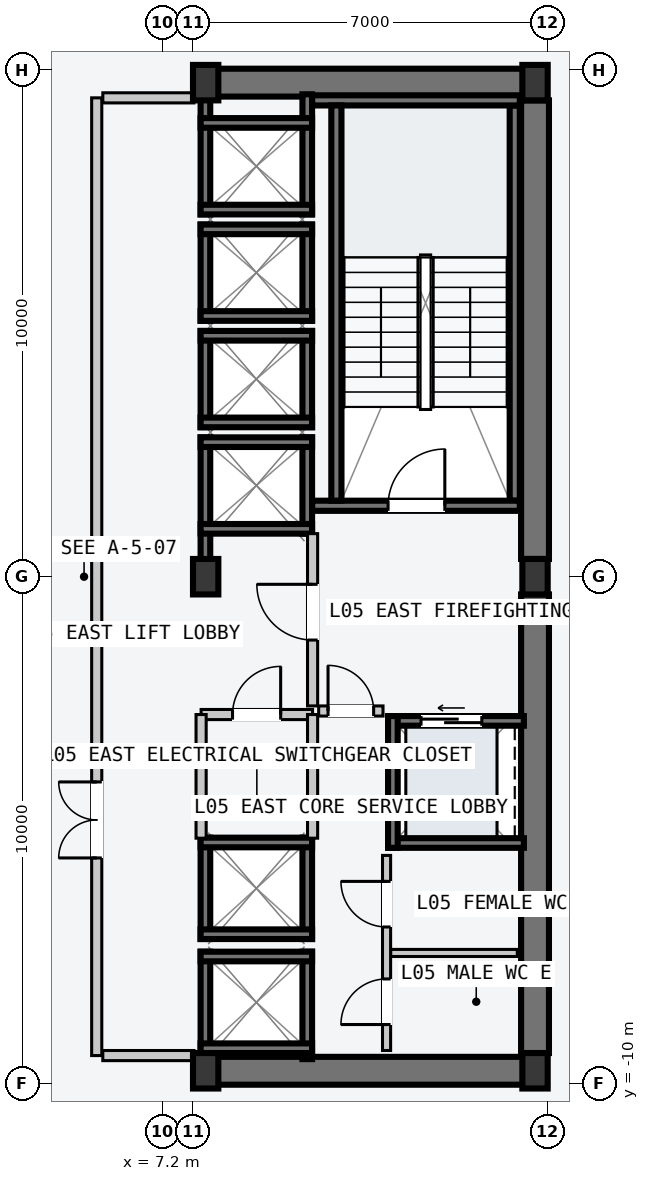
"""IFC4 building model, lengths in metres.
Left out: names, types, materials, properties, quantities, classifications, styles, units other than length and angle.
Written with IfcOpenShell. Run it as: python <this file> out.ifc"""

import sys

from ifc_helpers import new_model, si_unit, direction, frame, frame_2d, origin, origin_2d, place, context, subcontext, project, spatial, rectangle, i_section, extrude, element, fill, save


model = new_model("IFC4")
c1 = context("Model", 3, precision=1e-05, world=origin(), true_north=direction((0.0, 1.0)))
c2 = subcontext(c1, "Body", "Model", "MODEL_VIEW")
j1 = project(units=[si_unit("LENGTHUNIT", "METRE"), si_unit("PLANEANGLEUNIT", "RADIAN")], contexts=[c1])
p1 = place(None, origin())
s1 = spatial("IfcSite", under=j1, at=p1, CompositionType="ELEMENT")
p2 = place(p1, origin())
s2 = spatial("IfcBuilding", under=s1, at=p2, CompositionType="ELEMENT")
p3 = place(p2, frame((0.0, 0.0, 24.0)))
s3 = spatial("IfcBuildingStorey", under=s2, at=p3, CompositionType="ELEMENT", Elevation=24.0)
for number, where, z_axis, x_axis in (
    (1, (8.07, -9.75, -0.2), (0.0, 0.0, 1.0), (1.0, 0.0, 0.0)),
    (2, (8.07, 9.75, -0.2), (0.0, 0.0, 1.0), (1.0, 0.0, 0.0)),
):
    element("IfcWall", number, at=place(p3, frame(where, z_axis=z_axis, x_axis=x_axis)), inside=s3, PredefinedType="SHEAR", context=c2, shape_type="SweptSolid", body=[
        extrude(rectangle(XDim=6.46, YDim=0.55, at=frame_2d((3.23, 0.0))), origin(), (0.0, 0.0, 1.0), 3.6),
    ])
for number, where, z_axis, x_axis in (
    (3, (14.55, -9.4, -0.2), (0.0, 0.0, 1.0), (0.0, 1.0, 0.0)),
    (4, (14.55, 0.35, -0.2), (0.0, 0.0, 1.0), (0.0, 1.0, 0.0)),
):
    element("IfcWall", number, at=place(p3, frame(where, z_axis=z_axis, x_axis=x_axis)), inside=s3, PredefinedType="SHEAR", context=c2, shape_type="SweptSolid", body=[
        extrude(rectangle(XDim=9.05, YDim=0.55, at=frame_2d((4.525, 0.0))), origin(), (0.0, 0.0, 1.0), 3.6),
    ])
p4 = place(p3, frame((14.15, 1.5, -0.2), z_axis=(0.0, 0.0, 1.0), x_axis=(0.0, 1.0, 0.0)))
e5 = element("IfcWall", 5, at=p4, inside=s3, PredefinedType="SOLIDWALL", context=c2, shape_type="SweptSolid", body=[
    extrude(rectangle(XDim=7.8, YDim=0.2, at=frame_2d((3.9, 0.0))), origin(), (0.0, 0.0, 1.0), 3.6),
])
p5 = place(p3, frame((10.15, 1.4, -0.2), z_axis=(0.0, 0.0, 1.0), x_axis=(1.0, 0.0, 0.0)))
e6 = element("IfcWall", 6, at=p5, inside=s3, PredefinedType="SOLIDWALL", context=c2, shape_type="SweptSolid", body=[
    extrude(rectangle(XDim=4.1, YDim=0.2, at=frame_2d((2.05, 0.0))), origin(), (0.0, 0.0, 1.0), 3.6),
])
p6 = place(p5, frame((1.5, 0.0, 0.2)))
e7 = element("IfcOpeningElement", 7, at=p6, cuts=e6, PredefinedType="OPENING", context=c2, shape_type="SweptSolid", body=[
    extrude(rectangle(XDim=1.12, YDim=2.18, at=frame_2d((0.56, 1.09))), frame((0.0, 0.11, 0.0), z_axis=(0.0, -1.0, 0.0), x_axis=(1.0, 0.0, 0.0)), (0.0, 0.0, 1.0), 0.22),
])
p7 = place(p3, frame((10.15, 9.4, -0.2), z_axis=(0.0, 0.0, 1.0), x_axis=(1.0, 0.0, 0.0)))
e8 = element("IfcWall", 8, at=p7, inside=s3, PredefinedType="SOLIDWALL", context=c2, shape_type="SweptSolid", body=[
    extrude(rectangle(XDim=4.1, YDim=0.2, at=frame_2d((2.05, 0.0))), origin(), (0.0, 0.0, 1.0), 3.6),
])
p8 = place(p3, frame((10.63, 1.5, -0.2), z_axis=(0.0, 0.0, 1.0), x_axis=(0.0, 1.0, 0.0)))
e9 = element("IfcWall", 9, at=p8, inside=s3, PredefinedType="SOLIDWALL", context=c2, shape_type="SweptSolid", body=[
    extrude(rectangle(XDim=7.8, YDim=0.2, at=frame_2d((3.9, 0.0))), origin(), (0.0, 0.0, 1.0), 3.6),
])
for number, where, z_axis, x_axis in (
    (10, (8.05, -9.75, 0.0), (0.0, 0.0, 1.0), (1.0, 0.0, 0.0)),
    (11, (8.05, 0.0, 0.0), (0.0, 0.0, 1.0), (1.0, 0.0, 0.0)),
    (12, (8.05, 9.75, 0.0), (0.0, 0.0, 1.0), (1.0, 0.0, 0.0)),
    (13, (14.55, -9.75, 0.0), (0.0, 0.0, 1.0), (1.0, 0.0, 0.0)),
    (14, (14.55, 0.0, 0.0), (0.0, 0.0, 1.0), (1.0, 0.0, 0.0)),
    (15, (14.55, 9.75, 0.0), (0.0, 0.0, 1.0), (1.0, 0.0, 0.0)),
):
    element("IfcColumn", number, at=place(p3, frame(where, z_axis=z_axis, x_axis=x_axis)), inside=s3, PredefinedType="COLUMN", context=c2, shape_type="SweptSolid", body=[
        extrude(i_section(OverallWidth=0.5, OverallDepth=0.7, WebThickness=0.028, FlangeThickness=0.045, at=origin_2d()), origin(), (0.0, 0.0, 1.0), 3.6),
    ])
p9 = place(p3, frame((8.045, 0.21, -0.2), z_axis=(0.0, 0.0, 1.0), x_axis=(0.0, 1.0, 0.0)))
e16 = element("IfcWall", 16, at=p9, inside=s3, PredefinedType="SOLIDWALL", context=c2, shape_type="SweptSolid", body=[
    extrude(rectangle(XDim=2.54, YDim=0.19, at=frame_2d((1.27, 0.0))), origin(), (0.0, 0.0, 1.0), 3.6),
])
p10 = place(p3, frame((10.055, 0.85, -0.2), z_axis=(0.0, 0.0, 1.0), x_axis=(0.0, 1.0, 0.0)))
e17 = element("IfcWall", 17, at=p10, inside=s3, PredefinedType="SOLIDWALL", context=c2, shape_type="SweptSolid", body=[
    extrude(rectangle(XDim=1.9, YDim=0.19, at=frame_2d((0.95, 0.0))), origin(), (0.0, 0.0, 1.0), 3.6),
])
for number, where, z_axis, x_axis in (
    (18, (7.95, 2.655, -0.2), (0.0, 0.0, 1.0), (1.0, 0.0, 0.0)),
    (19, (7.95, 0.945, -0.2), (0.0, 0.0, 1.0), (1.0, 0.0, 0.0)),
):
    element("IfcWall", number, at=place(p3, frame(where, z_axis=z_axis, x_axis=x_axis)), inside=s3, PredefinedType="SOLIDWALL", context=c2, shape_type="SweptSolid", body=[
        extrude(rectangle(XDim=2.2, YDim=0.19, at=frame_2d((1.1, 0.0))), origin(), (0.0, 0.0, 1.0), 3.6),
    ])
for number, where, z_axis, x_axis in (
    (20, (8.045, 2.95, -0.2), (0.0, 0.0, 1.0), (0.0, 1.0, 0.0)),
    (21, (10.055, 2.95, -0.2), (0.0, 0.0, 1.0), (0.0, 1.0, 0.0)),
):
    element("IfcWall", number, at=place(p3, frame(where, z_axis=z_axis, x_axis=x_axis)), inside=s3, PredefinedType="SOLIDWALL", context=c2, shape_type="SweptSolid", body=[
        extrude(rectangle(XDim=1.9, YDim=0.19, at=frame_2d((0.95, 0.0))), origin(), (0.0, 0.0, 1.0), 3.6),
    ])
for number, where, z_axis, x_axis in (
    (22, (7.95, 4.755, -0.2), (0.0, 0.0, 1.0), (1.0, 0.0, 0.0)),
    (23, (7.95, 3.045, -0.2), (0.0, 0.0, 1.0), (1.0, 0.0, 0.0)),
):
    element("IfcWall", number, at=place(p3, frame(where, z_axis=z_axis, x_axis=x_axis)), inside=s3, PredefinedType="SOLIDWALL", context=c2, shape_type="SweptSolid", body=[
        extrude(rectangle(XDim=2.2, YDim=0.19, at=frame_2d((1.1, 0.0))), origin(), (0.0, 0.0, 1.0), 3.6),
    ])
for number, where, z_axis, x_axis in (
    (24, (8.045, 5.05, -0.2), (0.0, 0.0, 1.0), (0.0, 1.0, 0.0)),
    (25, (10.055, 5.05, -0.2), (0.0, 0.0, 1.0), (0.0, 1.0, 0.0)),
):
    element("IfcWall", number, at=place(p3, frame(where, z_axis=z_axis, x_axis=x_axis)), inside=s3, PredefinedType="SOLIDWALL", context=c2, shape_type="SweptSolid", body=[
        extrude(rectangle(XDim=1.9, YDim=0.19, at=frame_2d((0.95, 0.0))), origin(), (0.0, 0.0, 1.0), 3.6),
    ])
for number, where, z_axis, x_axis in (
    (26, (7.95, 6.855, -0.2), (0.0, 0.0, 1.0), (1.0, 0.0, 0.0)),
    (27, (7.95, 5.145, -0.2), (0.0, 0.0, 1.0), (1.0, 0.0, 0.0)),
):
    element("IfcWall", number, at=place(p3, frame(where, z_axis=z_axis, x_axis=x_axis)), inside=s3, PredefinedType="SOLIDWALL", context=c2, shape_type="SweptSolid", body=[
        extrude(rectangle(XDim=2.2, YDim=0.19, at=frame_2d((1.1, 0.0))), origin(), (0.0, 0.0, 1.0), 3.6),
    ])
for number, where, z_axis, x_axis in (
    (28, (8.045, 7.15, -0.2), (0.0, 0.0, 1.0), (0.0, 1.0, 0.0)),
    (29, (10.055, 7.15, -0.2), (0.0, 0.0, 1.0), (0.0, 1.0, 0.0)),
):
    element("IfcWall", number, at=place(p3, frame(where, z_axis=z_axis, x_axis=x_axis)), inside=s3, PredefinedType="SOLIDWALL", context=c2, shape_type="SweptSolid", body=[
        extrude(rectangle(XDim=2.37, YDim=0.19, at=frame_2d((1.185, 0.0))), origin(), (0.0, 0.0, 1.0), 3.6),
    ])
for number, where, z_axis, x_axis in (
    (30, (7.95, 8.955, -0.2), (0.0, 0.0, 1.0), (1.0, 0.0, 0.0)),
    (31, (7.95, 7.245, -0.2), (0.0, 0.0, 1.0), (1.0, 0.0, 0.0)),
):
    element("IfcWall", number, at=place(p3, frame(where, z_axis=z_axis, x_axis=x_axis)), inside=s3, PredefinedType="SOLIDWALL", context=c2, shape_type="SweptSolid", body=[
        extrude(rectangle(XDim=2.2, YDim=0.19, at=frame_2d((1.1, 0.0))), origin(), (0.0, 0.0, 1.0), 3.6),
    ])
for number, where, z_axis, x_axis in (
    (32, (8.045, -9.52, -0.2), (0.0, 0.0, 1.0), (0.0, 1.0, 0.0)),
    (33, (10.055, -9.52, -0.2), (0.0, 0.0, 1.0), (0.0, 1.0, 0.0)),
):
    element("IfcWall", number, at=place(p3, frame(where, z_axis=z_axis, x_axis=x_axis)), inside=s3, PredefinedType="SOLIDWALL", context=c2, shape_type="SweptSolid", body=[
        extrude(rectangle(XDim=2.12, YDim=0.19, at=frame_2d((1.06, 0.0))), origin(), (0.0, 0.0, 1.0), 3.6),
    ])
for number, where, z_axis, x_axis in (
    (34, (7.95, -7.495, -0.2), (0.0, 0.0, 1.0), (1.0, 0.0, 0.0)),
    (35, (7.95, -9.305, -0.2), (0.0, 0.0, 1.0), (1.0, 0.0, 0.0)),
):
    element("IfcWall", number, at=place(p3, frame(where, z_axis=z_axis, x_axis=x_axis)), inside=s3, PredefinedType="SOLIDWALL", context=c2, shape_type="SweptSolid", body=[
        extrude(rectangle(XDim=2.2, YDim=0.19, at=frame_2d((1.1, 0.0))), origin(), (0.0, 0.0, 1.0), 3.6),
    ])
for number, where, z_axis, x_axis in (
    (36, (8.045, -7.15, -0.2), (0.0, 0.0, 1.0), (0.0, 1.0, 0.0)),
    (37, (10.055, -7.15, -0.2), (0.0, 0.0, 1.0), (0.0, 1.0, 0.0)),
):
    element("IfcWall", number, at=place(p3, frame(where, z_axis=z_axis, x_axis=x_axis)), inside=s3, PredefinedType="SOLIDWALL", context=c2, shape_type="SweptSolid", body=[
        extrude(rectangle(XDim=2.0, YDim=0.19, at=frame_2d((1.0, 0.0))), origin(), (0.0, 0.0, 1.0), 3.6),
    ])
for number, where, z_axis, x_axis in (
    (38, (7.95, -5.245, -0.2), (0.0, 0.0, 1.0), (1.0, 0.0, 0.0)),
    (39, (7.95, -7.055, -0.2), (0.0, 0.0, 1.0), (1.0, 0.0, 0.0)),
):
    element("IfcWall", number, at=place(p3, frame(where, z_axis=z_axis, x_axis=x_axis)), inside=s3, PredefinedType="SOLIDWALL", context=c2, shape_type="SweptSolid", body=[
        extrude(rectangle(XDim=2.2, YDim=0.19, at=frame_2d((1.1, 0.0))), origin(), (0.0, 0.0, 1.0), 3.6),
    ])
p11 = place(p3, frame((11.65, -2.845, -0.2), z_axis=(0.0, 0.0, 1.0), x_axis=(1.0, 0.0, 0.0)))
e40 = element("IfcWall", 40, at=p11, inside=s3, PredefinedType="SOLIDWALL", context=c2, shape_type="SweptSolid", body=[
    extrude(rectangle(XDim=2.68, YDim=0.19, at=frame_2d((1.34, 0.0))), origin(), (0.0, 0.0, 1.0), 3.6),
])
p12 = place(p11, frame((0.65, 0.0, 0.2)))
e41 = element("IfcOpeningElement", 41, at=p12, cuts=e40, PredefinedType="OPENING", context=c2, shape_type="SweptSolid", body=[
    extrude(rectangle(XDim=1.2, YDim=2.2, at=frame_2d((0.6, 1.1))), frame((0.0, 0.105, 0.0), z_axis=(0.0, -1.0, 0.0), x_axis=(1.0, 0.0, 0.0)), (0.0, 0.0, 1.0), 0.21),
])
p13 = place(p3, frame((11.65, -5.255, -0.2), z_axis=(0.0, 0.0, 1.0), x_axis=(1.0, 0.0, 0.0)))
e42 = element("IfcWall", 42, at=p13, inside=s3, PredefinedType="SOLIDWALL", context=c2, shape_type="SweptSolid", body=[
    extrude(rectangle(XDim=2.68, YDim=0.19, at=frame_2d((1.34, 0.0))), origin(), (0.0, 0.0, 1.0), 3.6),
])
p14 = place(p3, frame((11.745, -5.35, -0.2), z_axis=(0.0, 0.0, 1.0), x_axis=(0.0, 1.0, 0.0)))
e43 = element("IfcWall", 43, at=p14, inside=s3, PredefinedType="SOLIDWALL", context=c2, shape_type="SweptSolid", body=[
    extrude(rectangle(XDim=2.6, YDim=0.19, at=frame_2d((1.3, 0.0))), origin(), (0.0, 0.0, 1.0), 3.6),
])
p15 = place(p3, frame((5.9, -9.45, 0.0), z_axis=(0.0, 0.0, 1.0), x_axis=(0.0, 1.0, 0.0)))
e44 = element("IfcWall", 44, at=p15, inside=s3, PredefinedType="PARTITIONING", context=c2, shape_type="SweptSolid", body=[
    extrude(rectangle(XDim=18.9, YDim=0.2, at=frame_2d((9.45, 0.0))), origin(), (0.0, 0.0, 1.0), 3.4),
])
p16 = place(p15, frame((3.9, 0.0, 0.0)))
e45 = element("IfcOpeningElement", 45, at=p16, cuts=e44, PredefinedType="OPENING", context=c2, shape_type="SweptSolid", body=[
    extrude(rectangle(XDim=1.5, YDim=2.2, at=frame_2d((0.75, 1.1))), frame((0.0, 0.11, 0.0), z_axis=(0.0, -1.0, 0.0), x_axis=(1.0, 0.0, 0.0)), (0.0, 0.0, 1.0), 0.22),
])
for number, where, z_axis, x_axis in (
    (46, (6.02, -9.45, 0.0), (0.0, 0.0, 1.0), (1.0, 0.0, 0.0)),
    (47, (6.02, 9.45, 0.0), (0.0, 0.0, 1.0), (1.0, 0.0, 0.0)),
):
    element("IfcWall", number, at=place(p3, frame(where, z_axis=z_axis, x_axis=x_axis)), inside=s3, PredefinedType="PARTITIONING", context=c2, shape_type="SweptSolid", body=[
        extrude(rectangle(XDim=1.8, YDim=0.2, at=frame_2d((0.9, 0.0))), origin(), (0.0, 0.0, 1.0), 3.4),
    ])
p17 = place(p3, frame((10.16, -2.55, 0.0), z_axis=(0.0, 0.0, 1.0), x_axis=(0.0, 1.0, 0.0)))
e48 = element("IfcWall", 48, at=p17, inside=s3, PredefinedType="PARTITIONING", context=c2, shape_type="SweptSolid", body=[
    extrude(rectangle(XDim=3.4, YDim=0.2, at=frame_2d((1.7, 0.0))), origin(), (0.0, 0.0, 1.0), 3.4),
])
p18 = place(p17, frame((1.3, 0.0, 0.0)))
e49 = element("IfcOpeningElement", 49, at=p18, cuts=e48, PredefinedType="OPENING", context=c2, shape_type="SweptSolid", body=[
    extrude(rectangle(XDim=1.1, YDim=2.15, at=frame_2d((0.55, 1.075))), frame((0.0, 0.11, 0.0), z_axis=(0.0, -1.0, 0.0), x_axis=(1.0, 0.0, 0.0)), (0.0, 0.0, 1.0), 0.22),
])
p19 = place(p3, frame((10.28, -2.65, 0.0), z_axis=(0.0, 0.0, 1.0), x_axis=(1.0, 0.0, 0.0)))
e50 = element("IfcWall", 50, at=p19, inside=s3, PredefinedType="PARTITIONING", context=c2, shape_type="SweptSolid", body=[
    extrude(rectangle(XDim=1.27, YDim=0.2, at=frame_2d((0.635, 0.0))), origin(), (0.0, 0.0, 1.0), 3.4),
])
p20 = place(p19, frame((0.185, 0.0, 0.0)))
e51 = element("IfcOpeningElement", 51, at=p20, cuts=e50, PredefinedType="OPENING", context=c2, shape_type="SweptSolid", body=[
    extrude(rectangle(XDim=0.9, YDim=2.15, at=frame_2d((0.45, 1.075))), frame((0.0, 0.11, 0.0), z_axis=(0.0, -1.0, 0.0), x_axis=(1.0, 0.0, 0.0)), (0.0, 0.0, 1.0), 0.22),
])
p21 = place(p3, frame((7.96, -2.72, 0.0), z_axis=(0.0, 0.0, 1.0), x_axis=(1.0, 0.0, 0.0)))
e52 = element("IfcWall", 52, at=p21, inside=s3, PredefinedType="PARTITIONING", context=c2, shape_type="SweptSolid", body=[
    extrude(rectangle(XDim=2.2, YDim=0.2, at=frame_2d((1.1, 0.0))), origin(), (0.0, 0.0, 1.0), 3.4),
])
p22 = place(p21, frame((0.62, 0.0, 0.0)))
e53 = element("IfcOpeningElement", 53, at=p22, cuts=e52, PredefinedType="OPENING", context=c2, shape_type="SweptSolid", body=[
    extrude(rectangle(XDim=0.95, YDim=2.1, at=frame_2d((0.475, 1.05))), frame((0.0, 0.11, 0.0), z_axis=(0.0, -1.0, 0.0), x_axis=(1.0, 0.0, 0.0)), (0.0, 0.0, 1.0), 0.22),
])
for number, where, z_axis, x_axis in (
    (54, (7.96, -5.16, 0.0), (0.0, 0.0, 1.0), (0.0, 1.0, 0.0)),
    (55, (10.16, -5.16, 0.0), (0.0, 0.0, 1.0), (0.0, 1.0, 0.0)),
):
    element("IfcWall", number, at=place(p3, frame(where, z_axis=z_axis, x_axis=x_axis)), inside=s3, PredefinedType="PARTITIONING", context=c2, shape_type="SweptSolid", body=[
        extrude(rectangle(XDim=2.44, YDim=0.2, at=frame_2d((1.22, 0.0))), origin(), (0.0, 0.0, 1.0), 3.4),
    ])
p23 = place(p3, frame((11.7, -7.425, 0.0), z_axis=(0.0, 0.0, 1.0), x_axis=(1.0, 0.0, 0.0)))
e56 = element("IfcWall", 56, at=p23, inside=s3, PredefinedType="PARTITIONING", context=c2, shape_type="SweptSolid", body=[
    extrude(rectangle(XDim=2.5, YDim=0.14, at=frame_2d((1.25, 0.0))), origin(), (0.0, 0.0, 1.0), 3.4),
])
p24 = place(p3, frame((11.62, -9.35, 0.0), z_axis=(0.0, 0.0, 1.0), x_axis=(0.0, 1.0, 0.0)))
e57 = element("IfcWall", 57, at=p24, inside=s3, PredefinedType="PARTITIONING", context=c2, shape_type="SweptSolid", body=[
    extrude(rectangle(XDim=3.85, YDim=0.16, at=frame_2d((1.925, 0.0))), origin(), (0.0, 0.0, 1.0), 3.4),
])
p25 = place(p24, frame((0.512, 0.0, 0.0)))
e58 = element("IfcOpeningElement", 58, at=p25, cuts=e57, PredefinedType="OPENING", context=c2, shape_type="SweptSolid", body=[
    extrude(rectangle(XDim=0.9, YDim=2.15, at=frame_2d((0.45, 1.075))), frame((0.0, 0.09, 0.0), z_axis=(0.0, -1.0, 0.0), x_axis=(1.0, 0.0, 0.0)), (0.0, 0.0, 1.0), 0.18),
])
p26 = place(p24, frame((2.438, 0.0, 0.0)))
e59 = element("IfcOpeningElement", 59, at=p26, cuts=e57, PredefinedType="OPENING", context=c2, shape_type="SweptSolid", body=[
    extrude(rectangle(XDim=0.9, YDim=2.15, at=frame_2d((0.45, 1.075))), frame((0.0, 0.09, 0.0), z_axis=(0.0, -1.0, 0.0), x_axis=(1.0, 0.0, 0.0)), (0.0, 0.0, 1.0), 0.18),
])
p27 = place(p6, origin())
e60 = element("IfcDoor", 60, at=p27, inside=s3, OperationType="SINGLE_SWING_RIGHT", PredefinedType="DOOR", context=c2, shape_type="SweptSolid", body=[
    extrude(rectangle(XDim=1.12, YDim=2.18, at=frame_2d((0.56, 1.09))), frame((0.0, 0.025, 0.0), z_axis=(0.0, -1.0, 0.0), x_axis=(1.0, 0.0, 0.0)), (0.0, 0.0, 1.0), 0.05),
])
fill(e7, e60)
p28 = place(p12, origin())
e61 = element("IfcDoor", 61, at=p28, inside=s3, OperationType="SLIDING_TO_LEFT", PredefinedType="DOOR", context=c2, shape_type="SweptSolid", body=[
    extrude(rectangle(XDim=1.2, YDim=2.2, at=frame_2d((0.6, 1.1))), frame((0.0, 0.025, 0.0), z_axis=(0.0, -1.0, 0.0), x_axis=(1.0, 0.0, 0.0)), (0.0, 0.0, 1.0), 0.05),
])
fill(e41, e61)
p29 = place(p16, origin())
e62 = element("IfcDoor", 62, at=p29, inside=s3, OperationType="DOUBLE_DOOR_SINGLE_SWING", PredefinedType="DOOR", context=c2, shape_type="SweptSolid", body=[
    extrude(rectangle(XDim=1.5, YDim=2.2, at=frame_2d((0.75, 1.1))), frame((0.0, 0.025, 0.0), z_axis=(0.0, -1.0, 0.0), x_axis=(1.0, 0.0, 0.0)), (0.0, 0.0, 1.0), 0.05),
])
fill(e45, e62)
p30 = place(p18, origin())
e63 = element("IfcDoor", 63, at=p30, inside=s3, OperationType="SINGLE_SWING_RIGHT", PredefinedType="DOOR", context=c2, shape_type="SweptSolid", body=[
    extrude(rectangle(XDim=1.1, YDim=2.15, at=frame_2d((0.55, 1.075))), frame((0.0, 0.025, 0.0), z_axis=(0.0, -1.0, 0.0), x_axis=(1.0, 0.0, 0.0)), (0.0, 0.0, 1.0), 0.05),
])
fill(e49, e63)
p31 = place(p20, origin())
e64 = element("IfcDoor", 64, at=p31, inside=s3, OperationType="SINGLE_SWING_LEFT", PredefinedType="DOOR", context=c2, shape_type="SweptSolid", body=[
    extrude(rectangle(XDim=0.9, YDim=2.15, at=frame_2d((0.45, 1.075))), frame((0.0, 0.025, 0.0), z_axis=(0.0, -1.0, 0.0), x_axis=(1.0, 0.0, 0.0)), (0.0, 0.0, 1.0), 0.05),
])
fill(e51, e64)
p32 = place(p22, origin())
e65 = element("IfcDoor", 65, at=p32, inside=s3, OperationType="SINGLE_SWING_RIGHT", PredefinedType="DOOR", context=c2, shape_type="SweptSolid", body=[
    extrude(rectangle(XDim=0.95, YDim=2.1, at=frame_2d((0.475, 1.05))), frame((0.0, 0.025, 0.0), z_axis=(0.0, -1.0, 0.0), x_axis=(1.0, 0.0, 0.0)), (0.0, 0.0, 1.0), 0.05),
])
fill(e53, e65)
p33 = place(p25, origin())
e66 = element("IfcDoor", 66, at=p33, inside=s3, OperationType="SINGLE_SWING_LEFT", PredefinedType="DOOR", context=c2, shape_type="SweptSolid", body=[
    extrude(rectangle(XDim=0.9, YDim=2.15, at=frame_2d((0.45, 1.075))), frame((0.0, 0.025, 0.0), z_axis=(0.0, -1.0, 0.0), x_axis=(1.0, 0.0, 0.0)), (0.0, 0.0, 1.0), 0.05),
])
fill(e58, e66)
p34 = place(p26, origin())
e67 = element("IfcDoor", 67, at=p34, inside=s3, OperationType="SINGLE_SWING_RIGHT", PredefinedType="DOOR", context=c2, shape_type="SweptSolid", body=[
    extrude(rectangle(XDim=0.9, YDim=2.15, at=frame_2d((0.45, 1.075))), frame((0.0, 0.025, 0.0), z_axis=(0.0, -1.0, 0.0), x_axis=(1.0, 0.0, 0.0)), (0.0, 0.0, 1.0), 0.05),
])
fill(e59, e67)
save(model, sys.argv[1])
